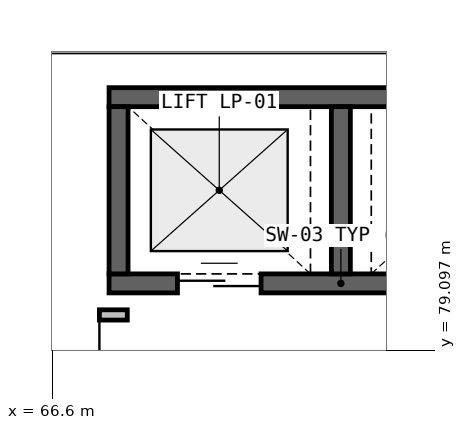
"""IFC4 building model, lengths in metres.
Left out: names, types, materials, properties, quantities, classifications, styles, units other than length and angle.
Written with IfcOpenShell. Run it as: python <this file> out.ifc"""

import sys

from ifc_helpers import new_model, si_unit, direction, frame, frame_2d, origin, place, context, subcontext, project, spatial, rectangle, extrude, element, fill, save


model = new_model("IFC4")
c1 = context("Model", 3, precision=1e-05, world=origin(), true_north=direction((0.0, 1.0)))
c2 = subcontext(c1, "Body", "Model", "MODEL_VIEW")
j1 = project(units=[si_unit("LENGTHUNIT", "METRE"), si_unit("PLANEANGLEUNIT", "RADIAN")], contexts=[c1])
p1 = place(None, origin())
s1 = spatial("IfcSite", under=j1, at=p1, CompositionType="ELEMENT")
p2 = place(p1, origin())
s2 = spatial("IfcBuilding", under=s1, at=p2, CompositionType="ELEMENT")
p3 = place(p2, frame((0.0, 0.0, 10.2)))
s3 = spatial("IfcBuildingStorey", under=s2, at=p3, CompositionType="ELEMENT", Elevation=10.2)
p4 = place(p3, frame((67.35, 79.975, 0.0), z_axis=(0.0, 0.0, 1.0), x_axis=(1.0, 0.0, 0.0)))
e1 = element("IfcWall", 1, at=p4, inside=s3, PredefinedType="SHEAR", context=c2, shape_type="SweptSolid", body=[
    extrude(rectangle(XDim=6.1, YDim=0.25, at=frame_2d((3.05, 0.0))), origin(), (0.0, 0.0, 1.0), 4.46),
])
p5 = place(p4, frame((0.9, 0.0, 0.0)))
e2 = element("IfcOpeningElement", 2, at=p5, cuts=e1, PredefinedType="OPENING", context=c2, shape_type="SweptSolid", body=[
    extrude(rectangle(XDim=1.1, YDim=2.15, at=frame_2d((0.55, 1.075))), frame((0.0, 0.135, 0.0), z_axis=(0.0, -1.0, 0.0), x_axis=(1.0, 0.0, 0.0)), (0.0, 0.0, 1.0), 0.27),
])
p6 = place(p4, frame((4.1, 0.0, 0.0)))
e3 = element("IfcOpeningElement", 3, at=p6, cuts=e1, PredefinedType="OPENING", context=c2, shape_type="SweptSolid", body=[
    extrude(rectangle(XDim=1.1, YDim=2.15, at=frame_2d((0.55, 1.075))), frame((0.0, 0.135, 0.0), z_axis=(0.0, -1.0, 0.0), x_axis=(1.0, 0.0, 0.0)), (0.0, 0.0, 1.0), 0.27),
])
p7 = place(p3, frame((73.45, 82.425, 0.0), z_axis=(0.0, 0.0, 1.0), x_axis=(-1.0, 0.0, 0.0)))
e4 = element("IfcWall", 4, at=p7, inside=s3, PredefinedType="SHEAR", context=c2, shape_type="SweptSolid", body=[
    extrude(rectangle(XDim=6.1, YDim=0.25, at=frame_2d((3.05, 0.0))), origin(), (0.0, 0.0, 1.0), 4.46),
])
for number, where, z_axis, x_axis in (
    (5, (67.475, 82.3, 0.0), (0.0, 0.0, 1.0), (0.0, -1.0, 0.0)),
    (6, (70.4, 80.1, 0.0), (0.0, 0.0, 1.0), (0.0, 1.0, 0.0)),
):
    element("IfcWall", number, at=place(p3, frame(where, z_axis=z_axis, x_axis=x_axis)), inside=s3, PredefinedType="SHEAR", context=c2, shape_type="SweptSolid", body=[
        extrude(rectangle(XDim=2.2, YDim=0.25, at=frame_2d((1.1, 0.0))), origin(), (0.0, 0.0, 1.0), 4.46),
    ])
p8 = place(p3, frame((67.59, 79.56, 0.0), z_axis=(0.0, 0.0, 1.0), x_axis=(-1.0, 0.0, 0.0)))
e7 = element("IfcWall", 7, at=p8, inside=s3, PredefinedType="PARTITIONING", context=c2, shape_type="SweptSolid", body=[
    extrude(rectangle(XDim=1.683, YDim=0.135, at=frame_2d((0.842, 0.0))), origin(), (0.0, 0.0, 1.0), 4.46),
])
p9 = place(p8, frame((0.367, 0.0, 0.0)))
e8 = element("IfcOpeningElement", 8, at=p9, cuts=e7, PredefinedType="OPENING", context=c2, shape_type="SweptSolid", body=[
    extrude(rectangle(XDim=0.95, YDim=2.1, at=frame_2d((0.475, 1.05))), frame((0.0, 0.077, 0.0), z_axis=(0.0, -1.0, 0.0), x_axis=(1.0, 0.0, 0.0)), (0.0, 0.0, 1.0), 0.155),
])
p10 = place(p5, origin())
e9 = element("IfcDoor", 9, at=p10, inside=s3, OperationType="DOUBLE_DOOR_SLIDING", PredefinedType="DOOR", context=c2, shape_type="SweptSolid", body=[
    extrude(rectangle(XDim=1.1, YDim=2.15, at=frame_2d((0.55, 1.075))), frame((0.0, 0.025, 0.0), z_axis=(0.0, -1.0, 0.0), x_axis=(1.0, 0.0, 0.0)), (0.0, 0.0, 1.0), 0.05),
])
fill(e2, e9)
p11 = place(p9, origin())
e10 = element("IfcDoor", 10, at=p11, inside=s3, OperationType="SINGLE_SWING_LEFT", PredefinedType="DOOR", context=c2, shape_type="SweptSolid", body=[
    extrude(rectangle(XDim=0.95, YDim=2.1, at=frame_2d((0.475, 1.05))), frame((0.0, 0.025, 0.0), z_axis=(0.0, -1.0, 0.0), x_axis=(1.0, 0.0, 0.0)), (0.0, 0.0, 1.0), 0.05),
])
fill(e8, e10)
save(model, sys.argv[1])
